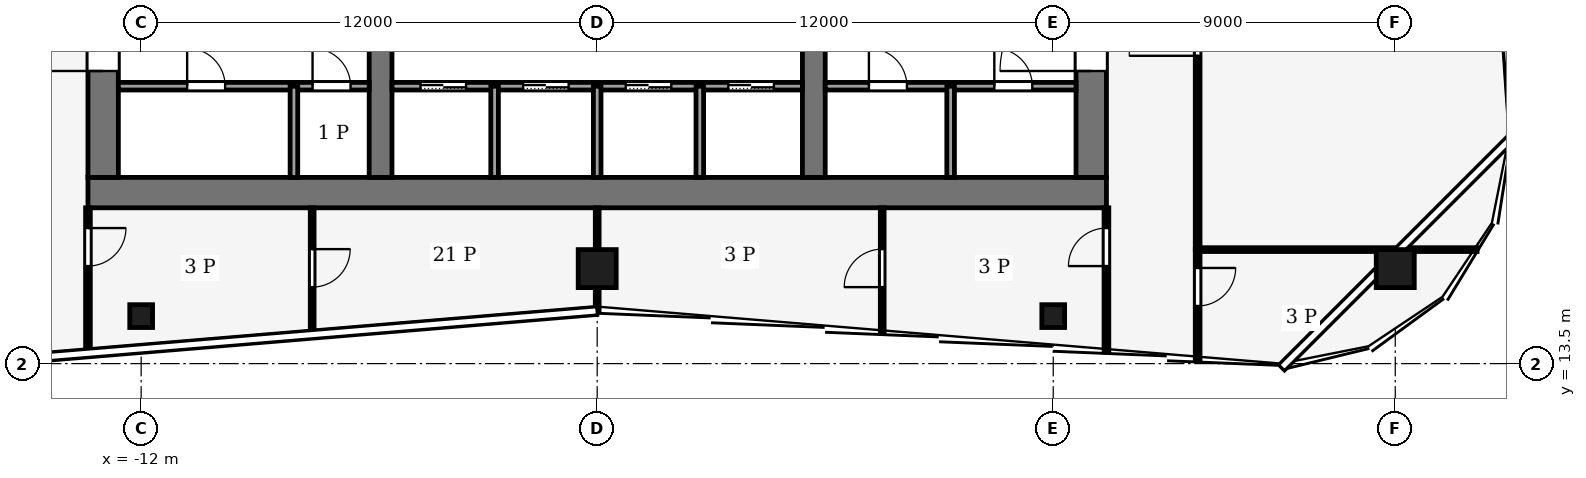
"""IFC4 building model, lengths in metres.
Left out: names, types, materials, properties, quantities, classifications, styles, units other than length and angle.
Written with IfcOpenShell. Run it as: python <this file> out.ifc"""

import sys

from ifc_helpers import new_model, si_unit, direction, frame, frame_2d, origin, origin_2d, place, context, subcontext, project, spatial, rectangle, hollow_rectangle, extrude, element, fill, save


model = new_model("IFC4")
c1 = context("Model", 3, precision=1e-05, world=origin(), true_north=direction((0.0, 1.0)))
c2 = subcontext(c1, "Body", "Model", "MODEL_VIEW")
j1 = project(units=[si_unit("LENGTHUNIT", "METRE"), si_unit("PLANEANGLEUNIT", "RADIAN")], contexts=[c1])
p1 = place(None, origin())
s1 = spatial("IfcSite", under=j1, at=p1, CompositionType="ELEMENT")
p2 = place(p1, origin())
s2 = spatial("IfcBuilding", under=s1, at=p2, CompositionType="ELEMENT")
p3 = place(p2, frame((0.0, 0.0, 258.0)))
s3 = spatial("IfcBuildingStorey", under=s2, at=p3, CompositionType="ELEMENT", Elevation=258.0)
p4 = place(p3, frame((-13.4, 18.0, -0.13), z_axis=(0.0, 0.0, 1.0), x_axis=(1.0, 0.0, 0.0)))
e1 = element("IfcWall", 1, at=p4, inside=s3, PredefinedType="SHEAR", context=c2, shape_type="SweptSolid", body=[
    extrude(rectangle(XDim=26.8, YDim=0.8, at=frame_2d((13.4, 0.0))), origin(), (0.0, 0.0, 1.0), 4.0),
])
p5 = place(p3, frame((-13.0, 18.4, -0.13), z_axis=(0.0, 0.0, 1.0), x_axis=(0.0, 1.0, 0.0)))
e2 = element("IfcWall", 2, at=p5, inside=s3, PredefinedType="SHEAR", context=c2, shape_type="SweptSolid", body=[
    extrude(rectangle(XDim=19.2, YDim=0.8, at=frame_2d((9.6, 0.0))), origin(), (0.0, 0.0, 1.0), 4.0),
])
p6 = place(p5, frame((2.8, 0.0, 0.13)))
e3 = element("IfcOpeningElement", 3, at=p6, cuts=e2, PredefinedType="OPENING", context=c2, shape_type="SweptSolid", body=[
    extrude(rectangle(XDim=2.4, YDim=2.4, at=frame_2d((1.2, 1.2))), frame((0.0, 0.41, 0.0), z_axis=(0.0, -1.0, 0.0), x_axis=(1.0, 0.0, 0.0)), (0.0, 0.0, 1.0), 0.82),
])
p7 = place(p5, frame((13.4, 0.0, 0.13)))
e4 = element("IfcOpeningElement", 4, at=p7, cuts=e2, PredefinedType="OPENING", context=c2, shape_type="SweptSolid", body=[
    extrude(rectangle(XDim=1.4, YDim=2.2, at=frame_2d((0.7, 1.1))), frame((0.0, 0.41, 0.0), z_axis=(0.0, -1.0, 0.0), x_axis=(1.0, 0.0, 0.0)), (0.0, 0.0, 1.0), 0.82),
])
p8 = place(p3, frame((13.0, 18.4, -0.13), z_axis=(0.0, 0.0, 1.0), x_axis=(0.0, 1.0, 0.0)))
e5 = element("IfcWall", 5, at=p8, inside=s3, PredefinedType="SHEAR", context=c2, shape_type="SweptSolid", body=[
    extrude(rectangle(XDim=19.2, YDim=0.8, at=frame_2d((9.6, 0.0))), origin(), (0.0, 0.0, 1.0), 4.0),
])
p9 = place(p8, frame((2.8, 0.0, 0.13)))
e6 = element("IfcOpeningElement", 6, at=p9, cuts=e5, PredefinedType="OPENING", context=c2, shape_type="SweptSolid", body=[
    extrude(rectangle(XDim=2.4, YDim=2.4, at=frame_2d((1.2, 1.2))), frame((0.0, 0.41, 0.0), z_axis=(0.0, -1.0, 0.0), x_axis=(1.0, 0.0, 0.0)), (0.0, 0.0, 1.0), 0.82),
])
p10 = place(p8, frame((13.3, 0.0, 0.13)))
e7 = element("IfcOpeningElement", 7, at=p10, cuts=e5, PredefinedType="OPENING", context=c2, shape_type="SweptSolid", body=[
    extrude(rectangle(XDim=2.4, YDim=2.4, at=frame_2d((1.2, 1.2))), frame((0.0, 0.41, 0.0), z_axis=(0.0, -1.0, 0.0), x_axis=(1.0, 0.0, 0.0)), (0.0, 0.0, 1.0), 0.82),
])
p11 = place(p3, frame((-5.7, 18.4, -0.13), z_axis=(0.0, 0.0, 1.0), x_axis=(0.0, 1.0, 0.0)))
e8 = element("IfcWall", 8, at=p11, inside=s3, PredefinedType="SHEAR", context=c2, shape_type="SweptSolid", body=[
    extrude(rectangle(XDim=19.2, YDim=0.6, at=frame_2d((9.6, 0.0))), origin(), (0.0, 0.0, 1.0), 4.0),
])
p12 = place(p11, frame((8.35, 0.0, 0.13)))
e9 = element("IfcOpeningElement", 9, at=p12, cuts=e8, PredefinedType="OPENING", context=c2, shape_type="SweptSolid", body=[
    extrude(rectangle(XDim=0.9, YDim=2.1, at=frame_2d((0.45, 1.05))), frame((0.0, 0.31, 0.0), z_axis=(0.0, -1.0, 0.0), x_axis=(1.0, 0.0, 0.0)), (0.0, 0.0, 1.0), 0.62),
])
p13 = place(p3, frame((5.7, 18.4, -0.13), z_axis=(0.0, 0.0, 1.0), x_axis=(0.0, 1.0, 0.0)))
e10 = element("IfcWall", 10, at=p13, inside=s3, PredefinedType="SHEAR", context=c2, shape_type="SweptSolid", body=[
    extrude(rectangle(XDim=19.2, YDim=0.6, at=frame_2d((9.6, 0.0))), origin(), (0.0, 0.0, 1.0), 4.0),
])
p14 = place(p13, frame((8.35, 0.0, 0.13)))
e11 = element("IfcOpeningElement", 11, at=p14, cuts=e10, PredefinedType="OPENING", context=c2, shape_type="SweptSolid", body=[
    extrude(rectangle(XDim=0.9, YDim=2.1, at=frame_2d((0.45, 1.05))), frame((0.0, 0.31, 0.0), z_axis=(0.0, -1.0, 0.0), x_axis=(1.0, 0.0, 0.0)), (0.0, 0.0, 1.0), 0.62),
])
p15 = place(p13, frame((13.3, 0.0, 0.13)))
e12 = element("IfcOpeningElement", 12, at=p15, cuts=e10, PredefinedType="OPENING", context=c2, shape_type="SweptSolid", body=[
    extrude(rectangle(XDim=2.4, YDim=2.4, at=frame_2d((1.2, 1.2))), frame((0.0, 0.31, 0.0), z_axis=(0.0, -1.0, 0.0), x_axis=(1.0, 0.0, 0.0)), (0.0, 0.0, 1.0), 0.62),
])
for number, where, z_axis, x_axis in (
    (13, (21.0, 16.0, 0.0), (0.0, 0.0, 1.0), (1.0, 0.0, 0.0)),
    (14, (0.0, 16.0, 0.0), (0.0, 0.0, 1.0), (1.0, 0.0, 0.0)),
):
    element("IfcColumn", number, at=place(p3, frame(where, z_axis=z_axis, x_axis=x_axis)), inside=s3, PredefinedType="COLUMN", context=c2, shape_type="SweptSolid", body=[
        extrude(hollow_rectangle(XDim=1.0, YDim=1.0, WallThickness=0.045, at=origin_2d()), origin(), (0.0, 0.0, 1.0), 4.0),
    ])
for number, where, z_axis, x_axis in (
    (15, (-12.0, 14.75, 0.0), (0.0, 0.0, 1.0), (1.0, 0.0, 0.0)),
    (16, (12.0, 14.75, 0.0), (0.0, 0.0, 1.0), (1.0, 0.0, 0.0)),
):
    element("IfcColumn", number, at=place(p3, frame(where, z_axis=z_axis, x_axis=x_axis)), inside=s3, PredefinedType="COLUMN", context=c2, shape_type="SweptSolid", body=[
        extrude(hollow_rectangle(XDim=0.6, YDim=0.6, WallThickness=0.025, at=origin_2d()), origin(), (0.0, 0.0, 1.0), 4.0),
    ])
p16 = place(p3, frame((-12.6, 20.8, 0.0), z_axis=(0.0, 0.0, 1.0), x_axis=(1.0, 0.0, 0.0)))
e17 = element("IfcWall", 17, at=p16, inside=s3, PredefinedType="PARTITIONING", context=c2, shape_type="SweptSolid", body=[
    extrude(rectangle(XDim=6.6, YDim=0.2, at=frame_2d((3.3, 0.0))), origin(), (0.0, 0.0, 1.0), 3.87),
])
p17 = place(p16, frame((1.81, 0.0, 0.0)))
e18 = element("IfcOpeningElement", 18, at=p17, cuts=e17, PredefinedType="OPENING", context=c2, shape_type="SweptSolid", body=[
    extrude(rectangle(XDim=1.0, YDim=2.1, at=frame_2d((0.5, 1.05))), frame((0.0, 0.11, 0.0), z_axis=(0.0, -1.0, 0.0), x_axis=(1.0, 0.0, 0.0)), (0.0, 0.0, 1.0), 0.22),
])
p18 = place(p16, frame((5.11, 0.0, 0.0)))
e19 = element("IfcOpeningElement", 19, at=p18, cuts=e17, PredefinedType="OPENING", context=c2, shape_type="SweptSolid", body=[
    extrude(rectangle(XDim=1.0, YDim=2.1, at=frame_2d((0.5, 1.05))), frame((0.0, 0.11, 0.0), z_axis=(0.0, -1.0, 0.0), x_axis=(1.0, 0.0, 0.0)), (0.0, 0.0, 1.0), 0.22),
])
p19 = place(p3, frame((-5.4, 20.8, 0.0), z_axis=(0.0, 0.0, 1.0), x_axis=(1.0, 0.0, 0.0)))
e20 = element("IfcWall", 20, at=p19, inside=s3, PredefinedType="PARTITIONING", context=c2, shape_type="SweptSolid", body=[
    extrude(rectangle(XDim=10.8, YDim=0.2, at=frame_2d((5.4, 0.0))), origin(), (0.0, 0.0, 1.0), 3.87),
])
p20 = place(p19, frame((0.75, 0.0, 0.0)))
e21 = element("IfcOpeningElement", 21, at=p20, cuts=e20, PredefinedType="OPENING", context=c2, shape_type="SweptSolid", body=[
    extrude(rectangle(XDim=1.2, YDim=2.2, at=frame_2d((0.6, 1.1))), frame((0.0, 0.11, 0.0), z_axis=(0.0, -1.0, 0.0), x_axis=(1.0, 0.0, 0.0)), (0.0, 0.0, 1.0), 0.22),
])
p21 = place(p19, frame((3.45, 0.0, 0.0)))
e22 = element("IfcOpeningElement", 22, at=p21, cuts=e20, PredefinedType="OPENING", context=c2, shape_type="SweptSolid", body=[
    extrude(rectangle(XDim=1.2, YDim=2.2, at=frame_2d((0.6, 1.1))), frame((0.0, 0.11, 0.0), z_axis=(0.0, -1.0, 0.0), x_axis=(1.0, 0.0, 0.0)), (0.0, 0.0, 1.0), 0.22),
])
p22 = place(p19, frame((6.15, 0.0, 0.0)))
e23 = element("IfcOpeningElement", 23, at=p22, cuts=e20, PredefinedType="OPENING", context=c2, shape_type="SweptSolid", body=[
    extrude(rectangle(XDim=1.2, YDim=2.2, at=frame_2d((0.6, 1.1))), frame((0.0, 0.11, 0.0), z_axis=(0.0, -1.0, 0.0), x_axis=(1.0, 0.0, 0.0)), (0.0, 0.0, 1.0), 0.22),
])
p23 = place(p19, frame((8.85, 0.0, 0.0)))
e24 = element("IfcOpeningElement", 24, at=p23, cuts=e20, PredefinedType="OPENING", context=c2, shape_type="SweptSolid", body=[
    extrude(rectangle(XDim=1.2, YDim=2.2, at=frame_2d((0.6, 1.1))), frame((0.0, 0.11, 0.0), z_axis=(0.0, -1.0, 0.0), x_axis=(1.0, 0.0, 0.0)), (0.0, 0.0, 1.0), 0.22),
])
p24 = place(p3, frame((6.0, 20.8, 0.0), z_axis=(0.0, 0.0, 1.0), x_axis=(1.0, 0.0, 0.0)))
e25 = element("IfcWall", 25, at=p24, inside=s3, PredefinedType="PARTITIONING", context=c2, shape_type="SweptSolid", body=[
    extrude(rectangle(XDim=6.6, YDim=0.2, at=frame_2d((3.3, 0.0))), origin(), (0.0, 0.0, 1.0), 3.87),
])
p25 = place(p24, frame((1.15, 0.0, 0.0)))
e26 = element("IfcOpeningElement", 26, at=p25, cuts=e25, PredefinedType="OPENING", context=c2, shape_type="SweptSolid", body=[
    extrude(rectangle(XDim=1.0, YDim=2.1, at=frame_2d((0.5, 1.05))), frame((0.0, 0.11, 0.0), z_axis=(0.0, -1.0, 0.0), x_axis=(1.0, 0.0, 0.0)), (0.0, 0.0, 1.0), 0.22),
])
p26 = place(p24, frame((4.45, 0.0, 0.0)))
e27 = element("IfcOpeningElement", 27, at=p26, cuts=e25, PredefinedType="OPENING", context=c2, shape_type="SweptSolid", body=[
    extrude(rectangle(XDim=1.0, YDim=2.1, at=frame_2d((0.5, 1.05))), frame((0.0, 0.11, 0.0), z_axis=(0.0, -1.0, 0.0), x_axis=(1.0, 0.0, 0.0)), (0.0, 0.0, 1.0), 0.22),
])
for number, where, z_axis, x_axis in (
    (28, (-7.98, 18.4, 0.0), (0.0, 0.0, 1.0), (0.0, 1.0, 0.0)),
    (29, (-2.7, 18.4, 0.0), (0.0, 0.0, 1.0), (0.0, 1.0, 0.0)),
    (30, (0.0, 18.4, 0.0), (0.0, 0.0, 1.0), (0.0, 1.0, 0.0)),
    (31, (2.7, 18.4, 0.0), (0.0, 0.0, 1.0), (0.0, 1.0, 0.0)),
    (32, (9.3, 18.4, 0.0), (0.0, 0.0, 1.0), (0.0, 1.0, 0.0)),
):
    element("IfcWall", number, at=place(p3, frame(where, z_axis=z_axis, x_axis=x_axis)), inside=s3, PredefinedType="PARTITIONING", context=c2, shape_type="SweptSolid", body=[
        extrude(rectangle(XDim=2.4, YDim=0.2, at=frame_2d((1.2, 0.0))), origin(), (0.0, 0.0, 1.0), 3.87),
    ])
p27 = place(p3, frame((15.8, 16.5, 0.0), z_axis=(0.0, 0.0, 1.0), x_axis=(0.0, -1.0, 0.0)))
e33 = element("IfcWall", 33, at=p27, inside=s3, PredefinedType="PARTITIONING", context=c2, shape_type="SweptSolid", body=[
    extrude(rectangle(XDim=2.897, YDim=0.125, at=frame_2d((1.448, 0.0))), origin(), (0.0, 0.0, 1.0), 3.04),
])
p28 = place(p27, frame((0.483, 0.0, 0.0)))
e34 = element("IfcOpeningElement", 34, at=p28, cuts=e33, PredefinedType="OPENING", context=c2, shape_type="SweptSolid", body=[
    extrude(rectangle(XDim=1.0, YDim=2.1, at=frame_2d((0.5, 1.05))), frame((0.0, 0.073, 0.0), z_axis=(0.0, -1.0, 0.0), x_axis=(1.0, 0.0, 0.0)), (0.0, 0.0, 1.0), 0.145),
])
p29 = place(p3, frame((15.8, 16.5, 0.0), z_axis=(0.0, 0.0, 1.0), x_axis=(0.0, 1.0, 0.0)))
e35 = element("IfcWall", 35, at=p29, inside=s3, PredefinedType="PARTITIONING", context=c2, shape_type="SweptSolid", body=[
    extrude(rectangle(XDim=12.0, YDim=0.125, at=frame_2d((6.0, 0.0))), origin(), (0.0, 0.0, 1.0), 3.14),
])
p30 = place(p29, frame((5.1, 0.0, 0.0)))
e36 = element("IfcOpeningElement", 36, at=p30, cuts=e35, PredefinedType="OPENING", context=c2, shape_type="SweptSolid", body=[
    extrude(rectangle(XDim=1.8, YDim=2.1, at=frame_2d((0.9, 1.05))), frame((0.0, 0.073, 0.0), z_axis=(0.0, -1.0, 0.0), x_axis=(1.0, 0.0, 0.0)), (0.0, 0.0, 1.0), 0.145),
])
p31 = place(p3, frame((-13.4, 17.6, 0.0), z_axis=(0.0, 0.0, 1.0), x_axis=(0.0, -1.0, 0.0)))
e37 = element("IfcWall", 37, at=p31, inside=s3, PredefinedType="PARTITIONING", context=c2, shape_type="SweptSolid", body=[
    extrude(rectangle(XDim=3.797, YDim=0.125, at=frame_2d((1.898, 0.0))), origin(), (0.0, 0.0, 1.0), 3.04),
])
p32 = place(p31, frame((0.533, 0.0, 0.0)))
e38 = element("IfcOpeningElement", 38, at=p32, cuts=e37, PredefinedType="OPENING", context=c2, shape_type="SweptSolid", body=[
    extrude(rectangle(XDim=1.0, YDim=2.1, at=frame_2d((0.5, 1.05))), frame((0.0, 0.073, 0.0), z_axis=(0.0, -1.0, 0.0), x_axis=(1.0, 0.0, 0.0)), (0.0, 0.0, 1.0), 0.145),
])
p33 = place(p3, frame((13.4, 13.803, 0.0), z_axis=(0.0, 0.0, 1.0), x_axis=(0.0, 1.0, 0.0)))
e39 = element("IfcWall", 39, at=p33, inside=s3, PredefinedType="PARTITIONING", context=c2, shape_type="SweptSolid", body=[
    extrude(rectangle(XDim=3.797, YDim=0.125, at=frame_2d((1.898, 0.0))), origin(), (0.0, 0.0, 1.0), 3.04),
])
p34 = place(p33, frame((2.263, 0.0, 0.0)))
e40 = element("IfcOpeningElement", 40, at=p34, cuts=e39, PredefinedType="OPENING", context=c2, shape_type="SweptSolid", body=[
    extrude(rectangle(XDim=1.0, YDim=2.1, at=frame_2d((0.5, 1.05))), frame((0.0, 0.073, 0.0), z_axis=(0.0, -1.0, 0.0), x_axis=(1.0, 0.0, 0.0)), (0.0, 0.0, 1.0), 0.145),
])
p35 = place(p3, frame((23.153, 16.5, 0.0), z_axis=(0.0, 0.0, 1.0), x_axis=(-1.0, 0.0, 0.0)))
e41 = element("IfcWall", 41, at=p35, inside=s3, PredefinedType="PARTITIONING", context=c2, shape_type="SweptSolid", body=[
    extrude(rectangle(XDim=7.353, YDim=0.1, at=frame_2d((3.676, 0.0))), origin(), (0.0, 0.0, 1.0), 2.93),
])
p36 = place(p3, frame((-7.5, 17.6, 0.0), z_axis=(0.0, 0.0, 1.0), x_axis=(0.0, -1.0, 0.0)))
e42 = element("IfcWall", 42, at=p36, inside=s3, PredefinedType="PARTITIONING", context=c2, shape_type="SweptSolid", body=[
    extrude(rectangle(XDim=3.305, YDim=0.1, at=frame_2d((1.653, 0.0))), origin(), (0.0, 0.0, 1.0), 3.04),
])
p37 = place(p36, frame((1.087, 0.0, 0.0)))
e43 = element("IfcOpeningElement", 43, at=p37, cuts=e42, PredefinedType="OPENING", context=c2, shape_type="SweptSolid", body=[
    extrude(rectangle(XDim=1.0, YDim=2.1, at=frame_2d((0.5, 1.05))), frame((0.0, 0.06, 0.0), z_axis=(0.0, -1.0, 0.0), x_axis=(1.0, 0.0, 0.0)), (0.0, 0.0, 1.0), 0.12),
])
p38 = place(p3, frame((0.0, 14.92, 0.0), z_axis=(0.0, 0.0, 1.0), x_axis=(0.0, 1.0, 0.0)))
e44 = element("IfcWall", 44, at=p38, inside=s3, PredefinedType="PARTITIONING", context=c2, shape_type="SweptSolid", body=[
    extrude(rectangle(XDim=2.68, YDim=0.1, at=frame_2d((1.34, 0.0))), origin(), (0.0, 0.0, 1.0), 3.54),
])
p39 = place(p3, frame((7.5, 14.295, 0.0), z_axis=(0.0, 0.0, 1.0), x_axis=(0.0, 1.0, 0.0)))
e45 = element("IfcWall", 45, at=p39, inside=s3, PredefinedType="PARTITIONING", context=c2, shape_type="SweptSolid", body=[
    extrude(rectangle(XDim=3.305, YDim=0.1, at=frame_2d((1.653, 0.0))), origin(), (0.0, 0.0, 1.0), 3.04),
])
p40 = place(p39, frame((1.218, 0.0, 0.0)))
e46 = element("IfcOpeningElement", 46, at=p40, cuts=e45, PredefinedType="OPENING", context=c2, shape_type="SweptSolid", body=[
    extrude(rectangle(XDim=1.0, YDim=2.1, at=frame_2d((0.5, 1.05))), frame((0.0, 0.06, 0.0), z_axis=(0.0, -1.0, 0.0), x_axis=(1.0, 0.0, 0.0)), (0.0, 0.0, 1.0), 0.12),
])
p41 = place(p20, origin())
e47 = element("IfcDoor", 47, at=p41, inside=s3, OperationType="SLIDING_TO_LEFT", PredefinedType="DOOR", context=c2, shape_type="SweptSolid", body=[
    extrude(rectangle(XDim=1.2, YDim=2.2, at=frame_2d((0.6, 1.1))), frame((0.0, 0.025, 0.0), z_axis=(0.0, -1.0, 0.0), x_axis=(1.0, 0.0, 0.0)), (0.0, 0.0, 1.0), 0.05),
])
fill(e21, e47)
p42 = place(p21, origin())
e48 = element("IfcDoor", 48, at=p42, inside=s3, OperationType="SLIDING_TO_LEFT", PredefinedType="DOOR", context=c2, shape_type="SweptSolid", body=[
    extrude(rectangle(XDim=1.2, YDim=2.2, at=frame_2d((0.6, 1.1))), frame((0.0, 0.025, 0.0), z_axis=(0.0, -1.0, 0.0), x_axis=(1.0, 0.0, 0.0)), (0.0, 0.0, 1.0), 0.05),
])
fill(e22, e48)
p43 = place(p22, origin())
e49 = element("IfcDoor", 49, at=p43, inside=s3, OperationType="SLIDING_TO_LEFT", PredefinedType="DOOR", context=c2, shape_type="SweptSolid", body=[
    extrude(rectangle(XDim=1.2, YDim=2.2, at=frame_2d((0.6, 1.1))), frame((0.0, 0.025, 0.0), z_axis=(0.0, -1.0, 0.0), x_axis=(1.0, 0.0, 0.0)), (0.0, 0.0, 1.0), 0.05),
])
fill(e23, e49)
p44 = place(p23, origin())
e50 = element("IfcDoor", 50, at=p44, inside=s3, OperationType="SLIDING_TO_LEFT", PredefinedType="DOOR", context=c2, shape_type="SweptSolid", body=[
    extrude(rectangle(XDim=1.2, YDim=2.2, at=frame_2d((0.6, 1.1))), frame((0.0, 0.025, 0.0), z_axis=(0.0, -1.0, 0.0), x_axis=(1.0, 0.0, 0.0)), (0.0, 0.0, 1.0), 0.05),
])
fill(e24, e50)
p45 = place(p17, origin())
e51 = element("IfcDoor", 51, at=p45, inside=s3, OperationType="SINGLE_SWING_LEFT", PredefinedType="DOOR", context=c2, shape_type="SweptSolid", body=[
    extrude(rectangle(XDim=1.0, YDim=2.1, at=frame_2d((0.5, 1.05))), frame((0.0, 0.025, 0.0), z_axis=(0.0, -1.0, 0.0), x_axis=(1.0, 0.0, 0.0)), (0.0, 0.0, 1.0), 0.05),
])
fill(e18, e51)
p46 = place(p18, origin())
e52 = element("IfcDoor", 52, at=p46, inside=s3, OperationType="SINGLE_SWING_LEFT", PredefinedType="DOOR", context=c2, shape_type="SweptSolid", body=[
    extrude(rectangle(XDim=1.0, YDim=2.1, at=frame_2d((0.5, 1.05))), frame((0.0, 0.025, 0.0), z_axis=(0.0, -1.0, 0.0), x_axis=(1.0, 0.0, 0.0)), (0.0, 0.0, 1.0), 0.05),
])
fill(e19, e52)
p47 = place(p25, origin())
e53 = element("IfcDoor", 53, at=p47, inside=s3, OperationType="SINGLE_SWING_LEFT", PredefinedType="DOOR", context=c2, shape_type="SweptSolid", body=[
    extrude(rectangle(XDim=1.0, YDim=2.1, at=frame_2d((0.5, 1.05))), frame((0.0, 0.025, 0.0), z_axis=(0.0, -1.0, 0.0), x_axis=(1.0, 0.0, 0.0)), (0.0, 0.0, 1.0), 0.05),
])
fill(e26, e53)
p48 = place(p26, origin())
e54 = element("IfcDoor", 54, at=p48, inside=s3, OperationType="SINGLE_SWING_LEFT", PredefinedType="DOOR", context=c2, shape_type="SweptSolid", body=[
    extrude(rectangle(XDim=1.0, YDim=2.1, at=frame_2d((0.5, 1.05))), frame((0.0, 0.025, 0.0), z_axis=(0.0, -1.0, 0.0), x_axis=(1.0, 0.0, 0.0)), (0.0, 0.0, 1.0), 0.05),
])
fill(e27, e54)
p49 = place(p6, origin())
e55 = element("IfcDoor", 55, at=p49, inside=s3, OperationType="DOUBLE_DOOR_SINGLE_SWING", PredefinedType="DOOR", context=c2, shape_type="SweptSolid", body=[
    extrude(rectangle(XDim=2.4, YDim=2.4, at=frame_2d((1.2, 1.2))), frame((0.0, 0.025, 0.0), z_axis=(0.0, -1.0, 0.0), x_axis=(1.0, 0.0, 0.0)), (0.0, 0.0, 1.0), 0.05),
])
fill(e3, e55)
p50 = place(p9, origin())
e56 = element("IfcDoor", 56, at=p50, inside=s3, OperationType="DOUBLE_DOOR_SINGLE_SWING", PredefinedType="DOOR", context=c2, shape_type="SweptSolid", body=[
    extrude(rectangle(XDim=2.4, YDim=2.4, at=frame_2d((1.2, 1.2))), frame((0.0, 0.025, 0.0), z_axis=(0.0, -1.0, 0.0), x_axis=(1.0, 0.0, 0.0)), (0.0, 0.0, 1.0), 0.05),
])
fill(e6, e56)
p51 = place(p28, origin())
e57 = element("IfcDoor", 57, at=p51, inside=s3, OperationType="SINGLE_SWING_LEFT", PredefinedType="DOOR", context=c2, shape_type="SweptSolid", body=[
    extrude(rectangle(XDim=1.0, YDim=2.1, at=frame_2d((0.5, 1.05))), frame((0.0, 0.025, 0.0), z_axis=(0.0, -1.0, 0.0), x_axis=(1.0, 0.0, 0.0)), (0.0, 0.0, 1.0), 0.05),
])
fill(e34, e57)
p52 = place(p30, origin())
e58 = element("IfcDoor", 58, at=p52, inside=s3, OperationType="DOUBLE_DOOR_SINGLE_SWING", PredefinedType="DOOR", context=c2, shape_type="SweptSolid", body=[
    extrude(rectangle(XDim=1.8, YDim=2.1, at=frame_2d((0.9, 1.05))), frame((0.0, 0.025, 0.0), z_axis=(0.0, -1.0, 0.0), x_axis=(1.0, 0.0, 0.0)), (0.0, 0.0, 1.0), 0.05),
])
fill(e36, e58)
p53 = place(p32, origin())
e59 = element("IfcDoor", 59, at=p53, inside=s3, OperationType="SINGLE_SWING_LEFT", PredefinedType="DOOR", context=c2, shape_type="SweptSolid", body=[
    extrude(rectangle(XDim=1.0, YDim=2.1, at=frame_2d((0.5, 1.05))), frame((0.0, 0.025, 0.0), z_axis=(0.0, -1.0, 0.0), x_axis=(1.0, 0.0, 0.0)), (0.0, 0.0, 1.0), 0.05),
])
fill(e38, e59)
p54 = place(p34, origin())
e60 = element("IfcDoor", 60, at=p54, inside=s3, OperationType="SINGLE_SWING_RIGHT", PredefinedType="DOOR", context=c2, shape_type="SweptSolid", body=[
    extrude(rectangle(XDim=1.0, YDim=2.1, at=frame_2d((0.5, 1.05))), frame((0.0, 0.025, 0.0), z_axis=(0.0, -1.0, 0.0), x_axis=(1.0, 0.0, 0.0)), (0.0, 0.0, 1.0), 0.05),
])
fill(e40, e60)
p55 = place(p37, origin())
e61 = element("IfcDoor", 61, at=p55, inside=s3, OperationType="SINGLE_SWING_LEFT", PredefinedType="DOOR", context=c2, shape_type="SweptSolid", body=[
    extrude(rectangle(XDim=1.0, YDim=2.1, at=frame_2d((0.5, 1.05))), frame((0.0, 0.025, 0.0), z_axis=(0.0, -1.0, 0.0), x_axis=(1.0, 0.0, 0.0)), (0.0, 0.0, 1.0), 0.05),
])
fill(e43, e61)
p56 = place(p40, origin())
e62 = element("IfcDoor", 62, at=p56, inside=s3, OperationType="SINGLE_SWING_RIGHT", PredefinedType="DOOR", context=c2, shape_type="SweptSolid", body=[
    extrude(rectangle(XDim=1.0, YDim=2.1, at=frame_2d((0.5, 1.05))), frame((0.0, 0.025, 0.0), z_axis=(0.0, -1.0, 0.0), x_axis=(1.0, 0.0, 0.0)), (0.0, 0.0, 1.0), 0.05),
])
fill(e46, e62)
save(model, sys.argv[1])
